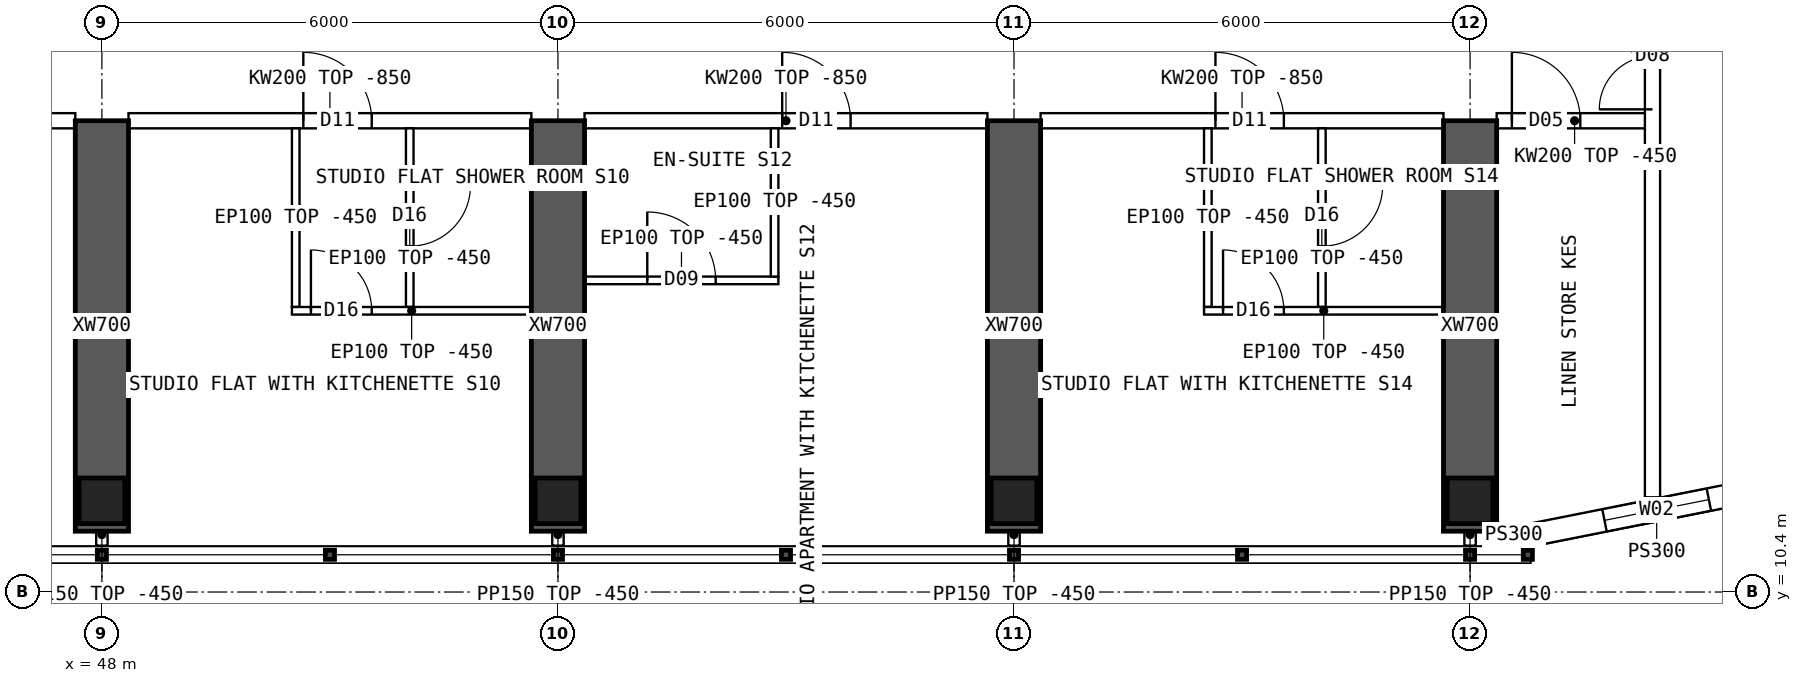
"""IFC4 building model, lengths in metres.
Left out: names, types, materials, properties, quantities, classifications, styles, units other than length and angle.
Written with IfcOpenShell. Run it as: python <this file> out.ifc"""

import sys

from ifc_helpers import new_model, si_unit, direction, frame, frame_2d, origin, origin_2d, place, context, subcontext, project, spatial, polyline, rectangle, hollow_rectangle, outline, extrude, element, fill, save


model = new_model("IFC4")
c1 = context("Model", 3, precision=1e-05, world=origin(), true_north=direction((0.0, 1.0)))
c2 = subcontext(c1, "Body", "Model", "MODEL_VIEW")
j1 = project(units=[si_unit("LENGTHUNIT", "METRE"), si_unit("PLANEANGLEUNIT", "RADIAN")], contexts=[c1])
p1 = place(None, origin())
s1 = spatial("IfcSite", under=j1, at=p1, CompositionType="ELEMENT")
p2 = place(p1, origin())
s2 = spatial("IfcBuilding", under=s1, at=p2, CompositionType="ELEMENT")
p3 = place(p2, frame((0.0, 0.0, 227.8)))
s3 = spatial("IfcBuildingStorey", under=s2, at=p3, CompositionType="ELEMENT", Elevation=227.8)
for number, where, z_axis, x_axis in (
    (1, (48.0, 11.6, 0.0), (0.0, 0.0, 1.0), (1.0, 0.0, 0.0)),
    (2, (54.0, 11.6, 0.0), (0.0, 0.0, 1.0), (1.0, 0.0, 0.0)),
    (3, (60.0, 11.6, 0.0), (0.0, 0.0, 1.0), (1.0, 0.0, 0.0)),
    (4, (66.0, 11.6, 0.0), (0.0, 0.0, 1.0), (1.0, 0.0, 0.0)),
):
    element("IfcColumn", number, at=place(p3, frame(where, z_axis=z_axis, x_axis=x_axis)), inside=s3, PredefinedType="COLUMN", context=c2, shape_type="SweptSolid", body=[
        extrude(hollow_rectangle(XDim=0.6, YDim=0.6, WallThickness=0.06, at=origin_2d()), origin(), (0.0, 0.0, 1.0), 3.75),
    ])
for number, where, z_axis, x_axis in (
    (5, (48.0, 11.2, 0.0), (0.0, 0.0, 1.0), (0.0, 1.0, 0.0)),
    (6, (54.0, 11.2, 0.0), (0.0, 0.0, 1.0), (0.0, 1.0, 0.0)),
    (7, (60.0, 11.2, 0.0), (0.0, 0.0, 1.0), (0.0, 1.0, 0.0)),
    (8, (66.0, 11.2, 0.0), (0.0, 0.0, 1.0), (0.0, 1.0, 0.0)),
):
    element("IfcWall", number, at=place(p3, frame(where, z_axis=z_axis, x_axis=x_axis)), inside=s3, PredefinedType="SHEAR", context=c2, shape_type="SweptSolid", body=[
        extrude(rectangle(XDim=5.4, YDim=0.7, at=frame_2d((2.7, 0.0))), origin(), (0.0, 0.0, 1.0), 3.75),
    ])
p4 = place(p3, frame((66.8, 11.15, 0.0), z_axis=(0.0, 0.0, 1.0), x_axis=(0.98078325777, 0.195100490205, 0.0)))
e9 = element("IfcWall", 9, at=p4, inside=s3, PredefinedType="SOLIDWALL", context=c2, shape_type="SweptSolid", body=[
    extrude(outline(polyline([(-0.03, -0.15), (3.405, -0.15), (3.345, 0.15), (0.03, 0.15), (-0.03, -0.15)])), origin(), (0.0, 0.0, 1.0), 3.3),
])
p5 = place(p4, frame((0.988, 0.0, 0.9)))
e10 = element("IfcOpeningElement", 10, at=p5, cuts=e9, PredefinedType="OPENING", context=c2, shape_type="SweptSolid", body=[
    extrude(rectangle(XDim=1.4, YDim=1.8, at=frame_2d((0.7, 0.9))), frame((0.0, 0.16, 0.0), z_axis=(0.0, -1.0, 0.0), x_axis=(1.0, 0.0, 0.0)), (0.0, 0.0, 1.0), 0.32),
])
p6 = place(p3, frame((66.8, 11.15, 0.0), z_axis=(0.0, 0.0, 1.0), x_axis=(-1.0, 0.0, 0.0)))
e11 = element("IfcWall", 11, at=p6, inside=s3, PredefinedType="SOLIDWALL", context=c2, shape_type="SweptSolid", body=[
    extrude(rectangle(XDim=0.45, YDim=0.3, at=frame_2d((0.225, 0.0))), origin(), (0.0, 0.0, 1.0), 3.3),
])
p7 = place(p3, frame((42.35, 16.6, 0.0), z_axis=(0.0, 0.0, 1.0), x_axis=(1.0, 0.0, 0.0)))
e12 = element("IfcWall", 12, at=p7, inside=s3, PredefinedType="SOLIDWALL", context=c2, shape_type="SweptSolid", body=[
    extrude(outline(polyline([(0.0, 0.0), (5.3, 0.0), (5.3, 2.9), (0.0, 2.9), (0.0, 0.0)])), frame((0.0, 0.1, 0.0), z_axis=(0.0, -1.0, 0.0), x_axis=(1.0, 0.0, 0.0)), (0.0, 0.0, 1.0), 0.2),
])
p8 = place(p7, frame((2.6, 0.0, 0.0)))
e13 = element("IfcOpeningElement", 13, at=p8, cuts=e12, PredefinedType="OPENING", context=c2, shape_type="SweptSolid", body=[
    extrude(rectangle(XDim=0.9, YDim=2.1, at=frame_2d((0.45, 1.05))), frame((0.0, 0.11, 0.0), z_axis=(0.0, -1.0, 0.0), x_axis=(1.0, 0.0, 0.0)), (0.0, 0.0, 1.0), 0.22),
])
p9 = place(p3, frame((48.35, 16.6, 0.0), z_axis=(0.0, 0.0, 1.0), x_axis=(1.0, 0.0, 0.0)))
e14 = element("IfcWall", 14, at=p9, inside=s3, PredefinedType="SOLIDWALL", context=c2, shape_type="SweptSolid", body=[
    extrude(outline(polyline([(0.0, 0.0), (5.3, 0.0), (5.3, 2.9), (0.0, 2.9), (0.0, 0.0)])), frame((0.0, 0.1, 0.0), z_axis=(0.0, -1.0, 0.0), x_axis=(1.0, 0.0, 0.0)), (0.0, 0.0, 1.0), 0.2),
])
p10 = place(p9, frame((2.3, 0.0, 0.0)))
e15 = element("IfcOpeningElement", 15, at=p10, cuts=e14, PredefinedType="OPENING", context=c2, shape_type="SweptSolid", body=[
    extrude(rectangle(XDim=0.9, YDim=2.1, at=frame_2d((0.45, 1.05))), frame((0.0, 0.11, 0.0), z_axis=(0.0, -1.0, 0.0), x_axis=(1.0, 0.0, 0.0)), (0.0, 0.0, 1.0), 0.22),
])
p11 = place(p3, frame((54.35, 16.6, 0.0), z_axis=(0.0, 0.0, 1.0), x_axis=(1.0, 0.0, 0.0)))
e16 = element("IfcWall", 16, at=p11, inside=s3, PredefinedType="SOLIDWALL", context=c2, shape_type="SweptSolid", body=[
    extrude(outline(polyline([(0.0, 0.0), (5.3, 0.0), (5.3, 2.9), (0.0, 2.9), (0.0, 0.0)])), frame((0.0, 0.1, 0.0), z_axis=(0.0, -1.0, 0.0), x_axis=(1.0, 0.0, 0.0)), (0.0, 0.0, 1.0), 0.2),
])
p12 = place(p11, frame((2.6, 0.0, 0.0)))
e17 = element("IfcOpeningElement", 17, at=p12, cuts=e16, PredefinedType="OPENING", context=c2, shape_type="SweptSolid", body=[
    extrude(rectangle(XDim=0.9, YDim=2.1, at=frame_2d((0.45, 1.05))), frame((0.0, 0.11, 0.0), z_axis=(0.0, -1.0, 0.0), x_axis=(1.0, 0.0, 0.0)), (0.0, 0.0, 1.0), 0.22),
])
p13 = place(p3, frame((60.35, 16.6, 0.0), z_axis=(0.0, 0.0, 1.0), x_axis=(1.0, 0.0, 0.0)))
e18 = element("IfcWall", 18, at=p13, inside=s3, PredefinedType="SOLIDWALL", context=c2, shape_type="SweptSolid", body=[
    extrude(outline(polyline([(0.0, 0.0), (5.3, 0.0), (5.3, 2.9), (0.0, 2.9), (0.0, 0.0)])), frame((0.0, 0.1, 0.0), z_axis=(0.0, -1.0, 0.0), x_axis=(1.0, 0.0, 0.0)), (0.0, 0.0, 1.0), 0.2),
])
p14 = place(p13, frame((2.3, 0.0, 0.0)))
e19 = element("IfcOpeningElement", 19, at=p14, cuts=e18, PredefinedType="OPENING", context=c2, shape_type="SweptSolid", body=[
    extrude(rectangle(XDim=0.9, YDim=2.1, at=frame_2d((0.45, 1.05))), frame((0.0, 0.11, 0.0), z_axis=(0.0, -1.0, 0.0), x_axis=(1.0, 0.0, 0.0)), (0.0, 0.0, 1.0), 0.22),
])
p15 = place(p3, frame((66.35, 16.6, 0.0), z_axis=(0.0, 0.0, 1.0), x_axis=(1.0, 0.0, 0.0)))
e20 = element("IfcWall", 20, at=p15, inside=s3, PredefinedType="SOLIDWALL", context=c2, shape_type="SweptSolid", body=[
    extrude(rectangle(XDim=2.05, YDim=0.2, at=frame_2d((1.025, 0.0))), origin(), (0.0, 0.0, 1.0), 3.3),
])
p16 = place(p15, frame((0.2, 0.0, 0.0)))
e21 = element("IfcOpeningElement", 21, at=p16, cuts=e20, PredefinedType="OPENING", context=c2, shape_type="SweptSolid", body=[
    extrude(rectangle(XDim=0.9, YDim=2.1, at=frame_2d((0.45, 1.05))), frame((0.0, 0.11, 0.0), z_axis=(0.0, -1.0, 0.0), x_axis=(1.0, 0.0, 0.0)), (0.0, 0.0, 1.0), 0.22),
])
p17 = place(p3, frame((53.65, 14.1, 0.0), z_axis=(0.0, 0.0, 1.0), x_axis=(-1.0, 0.0, 0.0)))
e22 = element("IfcWall", 22, at=p17, inside=s3, PredefinedType="PARTITIONING", context=c2, shape_type="SweptSolid", body=[
    extrude(rectangle(XDim=3.15, YDim=0.1, at=frame_2d((1.575, 0.0))), origin(), (0.0, 0.0, 1.0), 3.3),
])
p18 = place(p17, frame((2.1, 0.0, 0.0)))
e23 = element("IfcOpeningElement", 23, at=p18, cuts=e22, PredefinedType="OPENING", context=c2, shape_type="SweptSolid", body=[
    extrude(rectangle(XDim=0.8, YDim=2.1, at=frame_2d((0.4, 1.05))), frame((0.0, 0.06, 0.0), z_axis=(0.0, -1.0, 0.0), x_axis=(1.0, 0.0, 0.0)), (0.0, 0.0, 1.0), 0.12),
])
p19 = place(p3, frame((50.55, 14.15, 0.0), z_axis=(0.0, 0.0, 1.0), x_axis=(0.0, 1.0, 0.0)))
e24 = element("IfcWall", 24, at=p19, inside=s3, PredefinedType="PARTITIONING", context=c2, shape_type="SweptSolid", body=[
    extrude(outline(polyline([(0.0, 0.0), (2.35, 0.0), (2.35, 2.9), (2.302, 2.9), (2.3, 3.3), (0.0, 3.3), (0.0, 0.0)])), frame((0.0, 0.05, 0.0), z_axis=(0.0, -1.0, 0.0), x_axis=(1.0, 0.0, 0.0)), (0.0, 0.0, 1.0), 0.1),
])
p20 = place(p3, frame((52.05, 14.15, 0.0), z_axis=(0.0, 0.0, 1.0), x_axis=(0.0, 1.0, 0.0)))
e25 = element("IfcWall", 25, at=p20, inside=s3, PredefinedType="PARTITIONING", context=c2, shape_type="SweptSolid", body=[
    extrude(outline(polyline([(0.0, 0.0), (2.35, 0.0), (2.35, 2.9), (2.302, 2.9), (2.3, 3.3), (0.0, 3.3), (0.0, 0.0)])), frame((0.0, 0.05, 0.0), z_axis=(0.0, -1.0, 0.0), x_axis=(1.0, 0.0, 0.0)), (0.0, 0.0, 1.0), 0.1),
])
p21 = place(p20, frame((0.8, 0.0, 0.0)))
e26 = element("IfcOpeningElement", 26, at=p21, cuts=e25, PredefinedType="OPENING", context=c2, shape_type="SweptSolid", body=[
    extrude(rectangle(XDim=0.8, YDim=2.1, at=frame_2d((0.4, 1.05))), frame((0.0, 0.06, 0.0), z_axis=(0.0, -1.0, 0.0), x_axis=(1.0, 0.0, 0.0)), (0.0, 0.0, 1.0), 0.12),
])
p22 = place(p3, frame((56.9, 14.5, 0.0), z_axis=(0.0, 0.0, 1.0), x_axis=(-1.0, 0.0, 0.0)))
e27 = element("IfcWall", 27, at=p22, inside=s3, PredefinedType="PARTITIONING", context=c2, shape_type="SweptSolid", body=[
    extrude(rectangle(XDim=2.55, YDim=0.1, at=frame_2d((1.275, 0.0))), origin(), (0.0, 0.0, 1.0), 3.3),
])
p23 = place(p22, frame((0.825, 0.0, 0.0)))
e28 = element("IfcOpeningElement", 28, at=p23, cuts=e27, PredefinedType="OPENING", context=c2, shape_type="SweptSolid", body=[
    extrude(rectangle(XDim=0.9, YDim=2.1, at=frame_2d((0.45, 1.05))), frame((0.0, 0.06, 0.0), z_axis=(0.0, -1.0, 0.0), x_axis=(1.0, 0.0, 0.0)), (0.0, 0.0, 1.0), 0.12),
])
p24 = place(p3, frame((56.85, 14.55, 0.0), z_axis=(0.0, 0.0, 1.0), x_axis=(0.0, 1.0, 0.0)))
e29 = element("IfcWall", 29, at=p24, inside=s3, PredefinedType="PARTITIONING", context=c2, shape_type="SweptSolid", body=[
    extrude(outline(polyline([(0.0, 0.0), (1.95, 0.0), (1.95, 2.9), (1.902, 2.9), (1.9, 3.3), (0.0, 3.3), (0.0, 0.0)])), frame((0.0, 0.05, 0.0), z_axis=(0.0, -1.0, 0.0), x_axis=(1.0, 0.0, 0.0)), (0.0, 0.0, 1.0), 0.1),
])
p25 = place(p3, frame((65.65, 14.1, 0.0), z_axis=(0.0, 0.0, 1.0), x_axis=(-1.0, 0.0, 0.0)))
e30 = element("IfcWall", 30, at=p25, inside=s3, PredefinedType="PARTITIONING", context=c2, shape_type="SweptSolid", body=[
    extrude(rectangle(XDim=3.15, YDim=0.1, at=frame_2d((1.575, 0.0))), origin(), (0.0, 0.0, 1.0), 3.3),
])
p26 = place(p25, frame((2.1, 0.0, 0.0)))
e31 = element("IfcOpeningElement", 31, at=p26, cuts=e30, PredefinedType="OPENING", context=c2, shape_type="SweptSolid", body=[
    extrude(rectangle(XDim=0.8, YDim=2.1, at=frame_2d((0.4, 1.05))), frame((0.0, 0.06, 0.0), z_axis=(0.0, -1.0, 0.0), x_axis=(1.0, 0.0, 0.0)), (0.0, 0.0, 1.0), 0.12),
])
p27 = place(p3, frame((62.55, 14.15, 0.0), z_axis=(0.0, 0.0, 1.0), x_axis=(0.0, 1.0, 0.0)))
e32 = element("IfcWall", 32, at=p27, inside=s3, PredefinedType="PARTITIONING", context=c2, shape_type="SweptSolid", body=[
    extrude(outline(polyline([(0.0, 0.0), (2.35, 0.0), (2.35, 2.9), (2.302, 2.9), (2.3, 3.3), (0.0, 3.3), (0.0, 0.0)])), frame((0.0, 0.05, 0.0), z_axis=(0.0, -1.0, 0.0), x_axis=(1.0, 0.0, 0.0)), (0.0, 0.0, 1.0), 0.1),
])
p28 = place(p3, frame((64.05, 14.15, 0.0), z_axis=(0.0, 0.0, 1.0), x_axis=(0.0, 1.0, 0.0)))
e33 = element("IfcWall", 33, at=p28, inside=s3, PredefinedType="PARTITIONING", context=c2, shape_type="SweptSolid", body=[
    extrude(outline(polyline([(0.0, 0.0), (2.35, 0.0), (2.35, 2.9), (2.302, 2.9), (2.3, 3.3), (0.0, 3.3), (0.0, 0.0)])), frame((0.0, 0.05, 0.0), z_axis=(0.0, -1.0, 0.0), x_axis=(1.0, 0.0, 0.0)), (0.0, 0.0, 1.0), 0.1),
])
p29 = place(p28, frame((0.8, 0.0, 0.0)))
e34 = element("IfcOpeningElement", 34, at=p29, cuts=e33, PredefinedType="OPENING", context=c2, shape_type="SweptSolid", body=[
    extrude(rectangle(XDim=0.8, YDim=2.1, at=frame_2d((0.4, 1.05))), frame((0.0, 0.06, 0.0), z_axis=(0.0, -1.0, 0.0), x_axis=(1.0, 0.0, 0.0)), (0.0, 0.0, 1.0), 0.12),
])
p30 = place(p3, frame((68.4, 11.646, 0.0), z_axis=(0.0, 0.0, 1.0), x_axis=(0.0, 1.0, 0.0)))
e35 = element("IfcWall", 35, at=p30, inside=s3, PredefinedType="SOLIDWALL", context=c2, shape_type="SweptSolid", body=[
    extrude(rectangle(XDim=40.708, YDim=0.2, at=frame_2d((20.354, 0.0))), origin(), (0.0, 0.0, 1.0), 3.3),
])
p31 = place(p30, frame((13.434, 0.0, 0.0)))
e36 = element("IfcOpeningElement", 36, at=p31, cuts=e35, PredefinedType="OPENING", context=c2, shape_type="SweptSolid", body=[
    extrude(rectangle(XDim=1.2, YDim=2.1, at=frame_2d((0.6, 1.05))), frame((0.0, 0.11, 0.0), z_axis=(0.0, -1.0, 0.0), x_axis=(1.0, 0.0, 0.0)), (0.0, 0.0, 1.0), 0.22),
])
p32 = place(p30, frame((21.194, 0.0, 0.0)))
e37 = element("IfcOpeningElement", 37, at=p32, cuts=e35, PredefinedType="OPENING", context=c2, shape_type="SweptSolid", body=[
    extrude(rectangle(XDim=1.2, YDim=2.1, at=frame_2d((0.6, 1.05))), frame((0.0, 0.11, 0.0), z_axis=(0.0, -1.0, 0.0), x_axis=(1.0, 0.0, 0.0)), (0.0, 0.0, 1.0), 0.22),
])
p33 = place(p30, frame((5.104, 0.0, 0.0)))
e38 = element("IfcOpeningElement", 38, at=p33, cuts=e35, PredefinedType="OPENING", context=c2, shape_type="SweptSolid", body=[
    extrude(rectangle(XDim=1.4, YDim=2.1, at=frame_2d((0.7, 1.05))), frame((0.0, 0.11, 0.0), z_axis=(0.0, -1.0, 0.0), x_axis=(1.0, 0.0, 0.0)), (0.0, 0.0, 1.0), 0.22),
])
p34 = place(p30, frame((34.104, 0.0, 0.0)))
e39 = element("IfcOpeningElement", 39, at=p34, cuts=e35, PredefinedType="OPENING", context=c2, shape_type="SweptSolid", body=[
    extrude(rectangle(XDim=1.4, YDim=2.1, at=frame_2d((0.7, 1.05))), frame((0.0, 0.11, 0.0), z_axis=(0.0, -1.0, 0.0), x_axis=(1.0, 0.0, 0.0)), (0.0, 0.0, 1.0), 0.22),
])
for number, where, z_axis, x_axis in (
    (40, (48.0, 11.3, 0.0), (0.0, 0.0, 1.0), (0.0, -1.0, 0.0)),
    (41, (54.0, 11.3, 0.0), (0.0, 0.0, 1.0), (0.0, -1.0, 0.0)),
    (42, (60.0, 11.3, 0.0), (0.0, 0.0, 1.0), (0.0, -1.0, 0.0)),
    (43, (66.0, 11.3, 0.0), (0.0, 0.0, 1.0), (0.0, -1.0, 0.0)),
):
    element("IfcWall", number, at=place(p3, frame(where, z_axis=z_axis, x_axis=x_axis)), inside=s3, PredefinedType="PARTITIONING", context=c2, shape_type="SweptSolid", body=[
        extrude(rectangle(XDim=0.29, YDim=0.15, at=frame_2d((0.145, 0.0))), origin(), (0.0, 0.0, 1.0), 3.3),
    ])
p35 = place(p5, origin())
e44 = element("IfcWindow", 44, at=p35, inside=s3, PartitioningType="SINGLE_PANEL", PredefinedType="WINDOW", context=c2, shape_type="SweptSolid", body=[
    extrude(rectangle(XDim=1.4, YDim=1.8, at=frame_2d((0.7, 0.9))), frame((0.0, 0.03, 0.0), z_axis=(0.0, -1.0, 0.0), x_axis=(1.0, 0.0, 0.0)), (0.0, 0.0, 1.0), 0.06),
])
fill(e10, e44)
p36 = place(p18, origin())
e45 = element("IfcDoor", 45, at=p36, inside=s3, OperationType="SINGLE_SWING_RIGHT", PredefinedType="DOOR", context=c2, shape_type="SweptSolid", body=[
    extrude(rectangle(XDim=0.8, YDim=2.1, at=frame_2d((0.4, 1.05))), frame((0.0, 0.025, 0.0), z_axis=(0.0, -1.0, 0.0), x_axis=(1.0, 0.0, 0.0)), (0.0, 0.0, 1.0), 0.05),
])
fill(e23, e45)
p37 = place(p21, origin())
e46 = element("IfcDoor", 46, at=p37, inside=s3, OperationType="SINGLE_SWING_RIGHT", PredefinedType="DOOR", context=c2, shape_type="SweptSolid", body=[
    extrude(rectangle(XDim=0.8, YDim=2.1, at=frame_2d((0.4, 1.05))), frame((0.0, 0.025, 0.0), z_axis=(0.0, -1.0, 0.0), x_axis=(1.0, 0.0, 0.0)), (0.0, 0.0, 1.0), 0.05),
])
fill(e26, e46)
p38 = place(p10, origin())
e47 = element("IfcDoor", 47, at=p38, inside=s3, OperationType="SINGLE_SWING_LEFT", PredefinedType="DOOR", context=c2, shape_type="SweptSolid", body=[
    extrude(rectangle(XDim=0.9, YDim=2.1, at=frame_2d((0.45, 1.05))), frame((0.0, 0.025, 0.0), z_axis=(0.0, -1.0, 0.0), x_axis=(1.0, 0.0, 0.0)), (0.0, 0.0, 1.0), 0.05),
])
fill(e15, e47)
p39 = place(p23, origin())
e48 = element("IfcDoor", 48, at=p39, inside=s3, OperationType="SINGLE_SWING_RIGHT", PredefinedType="DOOR", context=c2, shape_type="SweptSolid", body=[
    extrude(rectangle(XDim=0.9, YDim=2.1, at=frame_2d((0.45, 1.05))), frame((0.0, 0.025, 0.0), z_axis=(0.0, -1.0, 0.0), x_axis=(1.0, 0.0, 0.0)), (0.0, 0.0, 1.0), 0.05),
])
fill(e28, e48)
p40 = place(p12, origin())
e49 = element("IfcDoor", 49, at=p40, inside=s3, OperationType="SINGLE_SWING_LEFT", PredefinedType="DOOR", context=c2, shape_type="SweptSolid", body=[
    extrude(rectangle(XDim=0.9, YDim=2.1, at=frame_2d((0.45, 1.05))), frame((0.0, 0.025, 0.0), z_axis=(0.0, -1.0, 0.0), x_axis=(1.0, 0.0, 0.0)), (0.0, 0.0, 1.0), 0.05),
])
fill(e17, e49)
p41 = place(p26, origin())
e50 = element("IfcDoor", 50, at=p41, inside=s3, OperationType="SINGLE_SWING_RIGHT", PredefinedType="DOOR", context=c2, shape_type="SweptSolid", body=[
    extrude(rectangle(XDim=0.8, YDim=2.1, at=frame_2d((0.4, 1.05))), frame((0.0, 0.025, 0.0), z_axis=(0.0, -1.0, 0.0), x_axis=(1.0, 0.0, 0.0)), (0.0, 0.0, 1.0), 0.05),
])
fill(e31, e50)
p42 = place(p29, origin())
e51 = element("IfcDoor", 51, at=p42, inside=s3, OperationType="SINGLE_SWING_RIGHT", PredefinedType="DOOR", context=c2, shape_type="SweptSolid", body=[
    extrude(rectangle(XDim=0.8, YDim=2.1, at=frame_2d((0.4, 1.05))), frame((0.0, 0.025, 0.0), z_axis=(0.0, -1.0, 0.0), x_axis=(1.0, 0.0, 0.0)), (0.0, 0.0, 1.0), 0.05),
])
fill(e34, e51)
p43 = place(p14, origin())
e52 = element("IfcDoor", 52, at=p43, inside=s3, OperationType="SINGLE_SWING_LEFT", PredefinedType="DOOR", context=c2, shape_type="SweptSolid", body=[
    extrude(rectangle(XDim=0.9, YDim=2.1, at=frame_2d((0.45, 1.05))), frame((0.0, 0.025, 0.0), z_axis=(0.0, -1.0, 0.0), x_axis=(1.0, 0.0, 0.0)), (0.0, 0.0, 1.0), 0.05),
])
fill(e19, e52)
p44 = place(p33, origin())
e53 = element("IfcDoor", 53, at=p44, inside=s3, OperationType="DOUBLE_DOOR_SINGLE_SWING", PredefinedType="DOOR", context=c2, shape_type="SweptSolid", body=[
    extrude(rectangle(XDim=1.4, YDim=2.1, at=frame_2d((0.7, 1.05))), frame((0.0, 0.025, 0.0), z_axis=(0.0, -1.0, 0.0), x_axis=(1.0, 0.0, 0.0)), (0.0, 0.0, 1.0), 0.05),
])
fill(e38, e53)
p45 = place(p16, origin())
e54 = element("IfcDoor", 54, at=p45, inside=s3, OperationType="SINGLE_SWING_LEFT", PredefinedType="DOOR", context=c2, shape_type="SweptSolid", body=[
    extrude(rectangle(XDim=0.9, YDim=2.1, at=frame_2d((0.45, 1.05))), frame((0.0, 0.025, 0.0), z_axis=(0.0, -1.0, 0.0), x_axis=(1.0, 0.0, 0.0)), (0.0, 0.0, 1.0), 0.05),
])
fill(e21, e54)
save(model, sys.argv[1])
